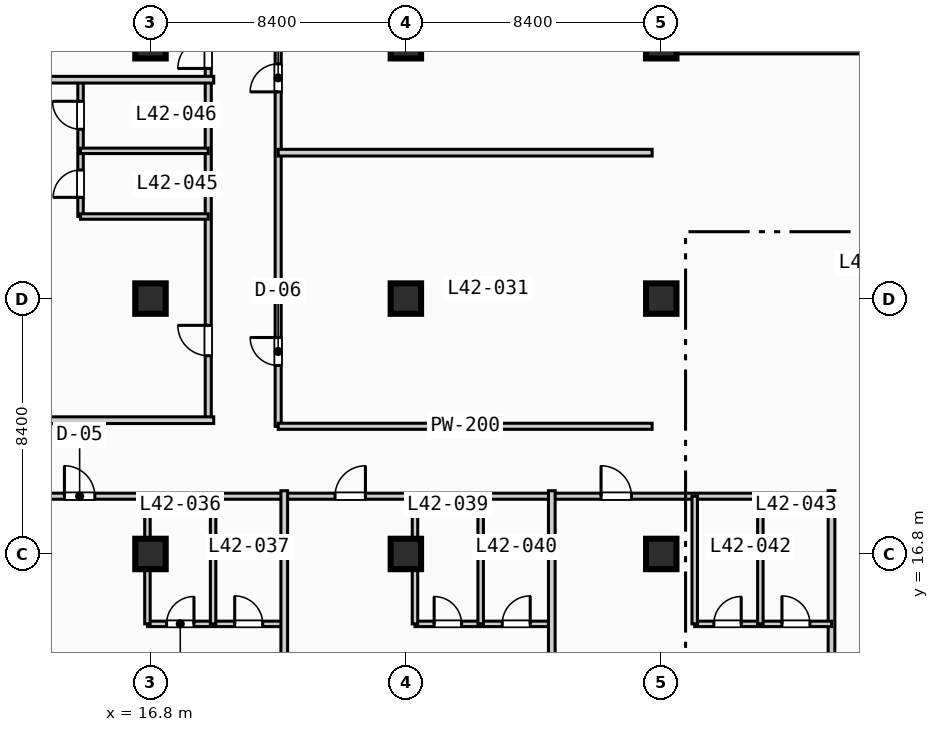
"""IFC4 building model, lengths in metres.
Left out: names, types, materials, properties, quantities, classifications, styles, units other than length and angle.
Written with IfcOpenShell. Run it as: python <this file> out.ifc"""

import sys

from ifc_helpers import new_model, si_unit, direction, frame, frame_2d, origin, origin_2d, place, context, subcontext, project, spatial, rectangle, extrude, element, fill, save


model = new_model("IFC4")
c1 = context("Model", 3, precision=1e-05, world=origin(), true_north=direction((0.0, 1.0)))
c2 = subcontext(c1, "Body", "Model", "MODEL_VIEW")
j1 = project(units=[si_unit("LENGTHUNIT", "METRE"), si_unit("PLANEANGLEUNIT", "RADIAN")], contexts=[c1])
p1 = place(None, origin())
s1 = spatial("IfcSite", under=j1, at=p1, CompositionType="ELEMENT")
p2 = place(p1, origin())
s2 = spatial("IfcBuilding", under=s1, at=p2, CompositionType="ELEMENT")
p3 = place(p2, frame((0.0, 0.0, 175.4)))
s3 = spatial("IfcBuildingStorey", under=s2, at=p3, CompositionType="ELEMENT", Elevation=175.4)
for number, where, z_axis, x_axis in (
    (1, (16.8, 16.8, 0.0), (0.0, 0.0, 1.0), (1.0, 0.0, 0.0)),
    (2, (16.8, 25.2, 0.0), (0.0, 0.0, 1.0), (1.0, 0.0, 0.0)),
    (3, (16.8, 33.6, 0.0), (0.0, 0.0, 1.0), (1.0, 0.0, 0.0)),
    (4, (25.2, 16.8, 0.0), (0.0, 0.0, 1.0), (1.0, 0.0, 0.0)),
    (5, (25.2, 25.2, 0.0), (0.0, 0.0, 1.0), (1.0, 0.0, 0.0)),
    (6, (25.2, 33.6, 0.0), (0.0, 0.0, 1.0), (1.0, 0.0, 0.0)),
    (7, (33.6, 16.8, 0.0), (0.0, 0.0, 1.0), (1.0, 0.0, 0.0)),
    (8, (33.6, 25.2, 0.0), (0.0, 0.0, 1.0), (1.0, 0.0, 0.0)),
    (9, (33.6, 33.6, 0.0), (0.0, 0.0, 1.0), (1.0, 0.0, 0.0)),
):
    element("IfcColumn", number, at=place(p3, frame(where, z_axis=z_axis, x_axis=x_axis)), inside=s3, PredefinedType="COLUMN", context=c2, shape_type="SweptSolid", body=[
        extrude(rectangle(XDim=1.0, YDim=1.0, at=origin_2d()), origin(), (0.0, 0.0, 1.0), 3.7),
    ])
p4 = place(p3, frame((33.425, 33.425, 0.0), z_axis=(0.0, 0.0, 1.0), x_axis=(1.0, 0.0, 0.0)))
e10 = element("IfcWall", 10, at=p4, inside=s3, PredefinedType="STANDARD", context=c2, shape_type="SweptSolid", body=[
    extrude(rectangle(XDim=39.0, YDim=0.35, at=frame_2d((19.5, 0.0))), origin(), (0.0, 0.0, 1.0), 3.47),
])
p5 = place(p4, frame((12.075, 0.0, 0.0)))
e11 = element("IfcOpeningElement", 11, at=p5, cuts=e10, PredefinedType="OPENING", context=c2, shape_type="SweptSolid", body=[
    extrude(rectangle(XDim=1.4, YDim=2.2, at=frame_2d((0.7, 1.1))), frame((0.0, 0.185, 0.0), z_axis=(0.0, -1.0, 0.0), x_axis=(1.0, 0.0, 0.0)), (0.0, 0.0, 1.0), 0.37),
])
p6 = place(p4, frame((20.275, 0.0, 0.85)))
e12 = element("IfcOpeningElement", 12, at=p6, cuts=e10, PredefinedType="OPENING", context=c2, shape_type="SweptSolid", body=[
    extrude(rectangle(XDim=1.8, YDim=1.8, at=frame_2d((0.9, 0.9))), frame((0.0, 0.185, 0.0), z_axis=(0.0, -1.0, 0.0), x_axis=(1.0, 0.0, 0.0)), (0.0, 0.0, 1.0), 0.37),
])
p7 = place(p4, frame((28.375, 0.0, 0.85)))
e13 = element("IfcOpeningElement", 13, at=p7, cuts=e10, PredefinedType="OPENING", context=c2, shape_type="SweptSolid", body=[
    extrude(rectangle(XDim=2.4, YDim=1.95, at=frame_2d((1.2, 0.975))), frame((0.0, 0.185, 0.0), z_axis=(0.0, -1.0, 0.0), x_axis=(1.0, 0.0, 0.0)), (0.0, 0.0, 1.0), 0.37),
])
p8 = place(p3, frame((21.0, 21.0, 0.0), z_axis=(0.0, 0.0, 1.0), x_axis=(0.0, 1.0, 0.0)))
e14 = element("IfcWall", 14, at=p8, inside=s3, PredefinedType="PARTITIONING", context=c2, shape_type="SweptSolid", body=[
    extrude(rectangle(XDim=18.2, YDim=0.2, at=frame_2d((9.1, 0.0))), origin(), (0.0, 0.0, 1.0), 3.47),
])
p9 = place(p8, frame((2.0, 0.0, 0.0)))
e15 = element("IfcOpeningElement", 15, at=p9, cuts=e14, PredefinedType="OPENING", context=c2, shape_type="SweptSolid", body=[
    extrude(rectangle(XDim=0.92, YDim=2.1, at=frame_2d((0.46, 1.05))), frame((0.0, 0.11, 0.0), z_axis=(0.0, -1.0, 0.0), x_axis=(1.0, 0.0, 0.0)), (0.0, 0.0, 1.0), 0.22),
])
p10 = place(p8, frame((11.0, 0.0, 0.0)))
e16 = element("IfcOpeningElement", 16, at=p10, cuts=e14, PredefinedType="OPENING", context=c2, shape_type="SweptSolid", body=[
    extrude(rectangle(XDim=0.92, YDim=2.1, at=frame_2d((0.46, 1.05))), frame((0.0, 0.11, 0.0), z_axis=(0.0, -1.0, 0.0), x_axis=(1.0, 0.0, 0.0)), (0.0, 0.0, 1.0), 0.22),
])
p11 = place(p3, frame((21.0, 21.0, 0.0), z_axis=(0.0, 0.0, 1.0), x_axis=(1.0, 0.0, 0.0)))
e17 = element("IfcWall", 17, at=p11, inside=s3, PredefinedType="PARTITIONING", context=c2, shape_type="SweptSolid", body=[
    extrude(rectangle(XDim=12.3, YDim=0.2, at=frame_2d((6.15, 0.0))), origin(), (0.0, 0.0, 1.0), 3.47),
])
p12 = place(p3, frame((21.0, 30.0, 0.0), z_axis=(0.0, 0.0, 1.0), x_axis=(1.0, 0.0, 0.0)))
e18 = element("IfcWall", 18, at=p12, inside=s3, PredefinedType="PARTITIONING", context=c2, shape_type="SweptSolid", body=[
    extrude(rectangle(XDim=12.3, YDim=0.22, at=frame_2d((6.15, 0.0))), origin(), (0.0, 0.0, 1.0), 3.47),
])
p13 = place(p3, frame((3.4, 18.7, 0.0), z_axis=(0.0, 0.0, 1.0), x_axis=(1.0, 0.0, 0.0)))
e19 = element("IfcWall", 19, at=p13, inside=s3, PredefinedType="PARTITIONING", context=c2, shape_type="SweptSolid", body=[
    extrude(rectangle(XDim=35.8, YDim=0.2, at=frame_2d((17.9, 0.0))), origin(), (0.0, 0.0, 1.0), 3.47),
])
p14 = place(p13, frame((1.67, 0.0, 0.0)))
e20 = element("IfcOpeningElement", 20, at=p14, cuts=e19, PredefinedType="OPENING", context=c2, shape_type="SweptSolid", body=[
    extrude(rectangle(XDim=1.0, YDim=2.15, at=frame_2d((0.5, 1.075))), frame((0.0, 0.11, 0.0), z_axis=(0.0, -1.0, 0.0), x_axis=(1.0, 0.0, 0.0)), (0.0, 0.0, 1.0), 0.22),
])
p15 = place(p13, frame((10.57, 0.0, 0.0)))
e21 = element("IfcOpeningElement", 21, at=p15, cuts=e19, PredefinedType="OPENING", context=c2, shape_type="SweptSolid", body=[
    extrude(rectangle(XDim=1.0, YDim=2.15, at=frame_2d((0.5, 1.075))), frame((0.0, 0.11, 0.0), z_axis=(0.0, -1.0, 0.0), x_axis=(1.0, 0.0, 0.0)), (0.0, 0.0, 1.0), 0.22),
])
p16 = place(p13, frame((19.47, 0.0, 0.0)))
e22 = element("IfcOpeningElement", 22, at=p16, cuts=e19, PredefinedType="OPENING", context=c2, shape_type="SweptSolid", body=[
    extrude(rectangle(XDim=1.0, YDim=2.15, at=frame_2d((0.5, 1.075))), frame((0.0, 0.11, 0.0), z_axis=(0.0, -1.0, 0.0), x_axis=(1.0, 0.0, 0.0)), (0.0, 0.0, 1.0), 0.22),
])
p17 = place(p13, frame((28.22, 0.0, 0.0)))
e23 = element("IfcOpeningElement", 23, at=p17, cuts=e19, PredefinedType="OPENING", context=c2, shape_type="SweptSolid", body=[
    extrude(rectangle(XDim=1.0, YDim=2.15, at=frame_2d((0.5, 1.075))), frame((0.0, 0.11, 0.0), z_axis=(0.0, -1.0, 0.0), x_axis=(1.0, 0.0, 0.0)), (0.0, 0.0, 1.0), 0.22),
])
p18 = place(p3, frame((16.7, 14.5, 0.0), z_axis=(0.0, 0.0, 1.0), x_axis=(1.0, 0.0, 0.0)))
e24 = element("IfcWall", 24, at=p18, inside=s3, PredefinedType="PLUMBINGWALL", context=c2, shape_type="SweptSolid", body=[
    extrude(rectangle(XDim=4.5, YDim=0.18, at=frame_2d((2.25, 0.0))), origin(), (0.0, 0.0, 1.0), 3.47),
])
p19 = place(p18, frame((0.63, 0.0, 0.0)))
e25 = element("IfcOpeningElement", 25, at=p19, cuts=e24, PredefinedType="OPENING", context=c2, shape_type="SweptSolid", body=[
    extrude(rectangle(XDim=0.9, YDim=2.1, at=frame_2d((0.45, 1.05))), frame((0.0, 0.1, 0.0), z_axis=(0.0, -1.0, 0.0), x_axis=(1.0, 0.0, 0.0)), (0.0, 0.0, 1.0), 0.2),
])
p20 = place(p18, frame((2.87, 0.0, 0.0)))
e26 = element("IfcOpeningElement", 26, at=p20, cuts=e24, PredefinedType="OPENING", context=c2, shape_type="SweptSolid", body=[
    extrude(rectangle(XDim=0.92, YDim=2.1, at=frame_2d((0.46, 1.05))), frame((0.0, 0.1, 0.0), z_axis=(0.0, -1.0, 0.0), x_axis=(1.0, 0.0, 0.0)), (0.0, 0.0, 1.0), 0.2),
])
p21 = place(p3, frame((16.7, 14.5, 0.0), z_axis=(0.0, 0.0, 1.0), x_axis=(0.0, 1.0, 0.0)))
e27 = element("IfcWall", 27, at=p21, inside=s3, PredefinedType="PLUMBINGWALL", context=c2, shape_type="SweptSolid", body=[
    extrude(rectangle(XDim=4.2, YDim=0.18, at=frame_2d((2.1, 0.0))), origin(), (0.0, 0.0, 1.0), 2.82),
])
p22 = place(p3, frame((18.86, 14.5, 0.0), z_axis=(0.0, 0.0, 1.0), x_axis=(0.0, 1.0, 0.0)))
e28 = element("IfcWall", 28, at=p22, inside=s3, PredefinedType="PLUMBINGWALL", context=c2, shape_type="SweptSolid", body=[
    extrude(rectangle(XDim=4.2, YDim=0.18, at=frame_2d((2.1, 0.0))), origin(), (0.0, 0.0, 1.0), 3.47),
])
p23 = place(p3, frame((21.2, 0.2, 0.0), z_axis=(0.0, 0.0, 1.0), x_axis=(0.0, 1.0, 0.0)))
e29 = element("IfcWall", 29, at=p23, inside=s3, PredefinedType="PARTITIONING", context=c2, shape_type="SweptSolid", body=[
    extrude(rectangle(XDim=18.68, YDim=0.22, at=frame_2d((9.34, 0.0))), origin(), (0.0, 0.0, 1.0), 3.47),
])
p24 = place(p3, frame((25.5, 14.5, 0.0), z_axis=(0.0, 0.0, 1.0), x_axis=(1.0, 0.0, 0.0)))
e30 = element("IfcWall", 30, at=p24, inside=s3, PredefinedType="PLUMBINGWALL", context=c2, shape_type="SweptSolid", body=[
    extrude(rectangle(XDim=4.5, YDim=0.18, at=frame_2d((2.25, 0.0))), origin(), (0.0, 0.0, 1.0), 3.47),
])
p25 = place(p24, frame((0.63, 0.0, 0.0)))
e31 = element("IfcOpeningElement", 31, at=p25, cuts=e30, PredefinedType="OPENING", context=c2, shape_type="SweptSolid", body=[
    extrude(rectangle(XDim=0.9, YDim=2.1, at=frame_2d((0.45, 1.05))), frame((0.0, 0.1, 0.0), z_axis=(0.0, -1.0, 0.0), x_axis=(1.0, 0.0, 0.0)), (0.0, 0.0, 1.0), 0.2),
])
p26 = place(p24, frame((2.87, 0.0, 0.0)))
e32 = element("IfcOpeningElement", 32, at=p26, cuts=e30, PredefinedType="OPENING", context=c2, shape_type="SweptSolid", body=[
    extrude(rectangle(XDim=0.92, YDim=2.1, at=frame_2d((0.46, 1.05))), frame((0.0, 0.1, 0.0), z_axis=(0.0, -1.0, 0.0), x_axis=(1.0, 0.0, 0.0)), (0.0, 0.0, 1.0), 0.2),
])
p27 = place(p3, frame((25.5, 14.5, 0.0), z_axis=(0.0, 0.0, 1.0), x_axis=(0.0, 1.0, 0.0)))
e33 = element("IfcWall", 33, at=p27, inside=s3, PredefinedType="PLUMBINGWALL", context=c2, shape_type="SweptSolid", body=[
    extrude(rectangle(XDim=4.2, YDim=0.18, at=frame_2d((2.1, 0.0))), origin(), (0.0, 0.0, 1.0), 2.82),
])
p28 = place(p3, frame((27.66, 14.5, 0.0), z_axis=(0.0, 0.0, 1.0), x_axis=(0.0, 1.0, 0.0)))
e34 = element("IfcWall", 34, at=p28, inside=s3, PredefinedType="PLUMBINGWALL", context=c2, shape_type="SweptSolid", body=[
    extrude(rectangle(XDim=4.2, YDim=0.18, at=frame_2d((2.1, 0.0))), origin(), (0.0, 0.0, 1.0), 3.47),
])
for number, where, z_axis, x_axis in (
    (35, (30.0, 0.2, 0.0), (0.0, 0.0, 1.0), (0.0, 1.0, 0.0)),
    (36, (39.2, 0.2, 0.0), (0.0, 0.0, 1.0), (0.0, 1.0, 0.0)),
):
    element("IfcWall", number, at=place(p3, frame(where, z_axis=z_axis, x_axis=x_axis)), inside=s3, PredefinedType="PARTITIONING", context=c2, shape_type="SweptSolid", body=[
        extrude(rectangle(XDim=18.68, YDim=0.22, at=frame_2d((9.34, 0.0))), origin(), (0.0, 0.0, 1.0), 3.47),
    ])
p29 = place(p3, frame((34.7, 14.5, 0.0), z_axis=(0.0, 0.0, 1.0), x_axis=(1.0, 0.0, 0.0)))
e37 = element("IfcWall", 37, at=p29, inside=s3, PredefinedType="PLUMBINGWALL", context=c2, shape_type="SweptSolid", body=[
    extrude(rectangle(XDim=4.5, YDim=0.18, at=frame_2d((2.25, 0.0))), origin(), (0.0, 0.0, 1.0), 3.47),
])
p30 = place(p29, frame((0.63, 0.0, 0.0)))
e38 = element("IfcOpeningElement", 38, at=p30, cuts=e37, PredefinedType="OPENING", context=c2, shape_type="SweptSolid", body=[
    extrude(rectangle(XDim=0.9, YDim=2.1, at=frame_2d((0.45, 1.05))), frame((0.0, 0.1, 0.0), z_axis=(0.0, -1.0, 0.0), x_axis=(1.0, 0.0, 0.0)), (0.0, 0.0, 1.0), 0.2),
])
p31 = place(p29, frame((2.87, 0.0, 0.0)))
e39 = element("IfcOpeningElement", 39, at=p31, cuts=e37, PredefinedType="OPENING", context=c2, shape_type="SweptSolid", body=[
    extrude(rectangle(XDim=0.92, YDim=2.1, at=frame_2d((0.46, 1.05))), frame((0.0, 0.1, 0.0), z_axis=(0.0, -1.0, 0.0), x_axis=(1.0, 0.0, 0.0)), (0.0, 0.0, 1.0), 0.2),
])
for number, where, z_axis, x_axis in (
    (40, (34.7, 14.5, 0.0), (0.0, 0.0, 1.0), (0.0, 1.0, 0.0)),
    (41, (36.86, 14.5, 0.0), (0.0, 0.0, 1.0), (0.0, 1.0, 0.0)),
):
    element("IfcWall", number, at=place(p3, frame(where, z_axis=z_axis, x_axis=x_axis)), inside=s3, PredefinedType="PLUMBINGWALL", context=c2, shape_type="SweptSolid", body=[
        extrude(rectangle(XDim=4.2, YDim=0.18, at=frame_2d((2.1, 0.0))), origin(), (0.0, 0.0, 1.0), 3.47),
    ])
p32 = place(p3, frame((18.7, 21.2, 0.0), z_axis=(0.0, 0.0, 1.0), x_axis=(0.0, 1.0, 0.0)))
e42 = element("IfcWall", 42, at=p32, inside=s3, PredefinedType="PARTITIONING", context=c2, shape_type="SweptSolid", body=[
    extrude(rectangle(XDim=18.0, YDim=0.2, at=frame_2d((9.0, 0.0))), origin(), (0.0, 0.0, 1.0), 3.47),
])
p33 = place(p32, frame((2.12, 0.0, 0.0)))
e43 = element("IfcOpeningElement", 43, at=p33, cuts=e42, PredefinedType="OPENING", context=c2, shape_type="SweptSolid", body=[
    extrude(rectangle(XDim=1.0, YDim=2.15, at=frame_2d((0.5, 1.075))), frame((0.0, 0.11, 0.0), z_axis=(0.0, -1.0, 0.0), x_axis=(1.0, 0.0, 0.0)), (0.0, 0.0, 1.0), 0.22),
])
p34 = place(p32, frame((11.57, 0.0, 0.0)))
e44 = element("IfcOpeningElement", 44, at=p34, cuts=e42, PredefinedType="OPENING", context=c2, shape_type="SweptSolid", body=[
    extrude(rectangle(XDim=1.0, YDim=2.15, at=frame_2d((0.5, 1.075))), frame((0.0, 0.11, 0.0), z_axis=(0.0, -1.0, 0.0), x_axis=(1.0, 0.0, 0.0)), (0.0, 0.0, 1.0), 0.22),
])
p35 = place(p3, frame((0.2, 21.2, 0.0), z_axis=(0.0, 0.0, 1.0), x_axis=(1.0, 0.0, 0.0)))
e45 = element("IfcWall", 45, at=p35, inside=s3, PredefinedType="PARTITIONING", context=c2, shape_type="SweptSolid", body=[
    extrude(rectangle(XDim=18.68, YDim=0.22, at=frame_2d((9.34, 0.0))), origin(), (0.0, 0.0, 1.0), 3.47),
])
p36 = place(p3, frame((14.5, 27.9, 0.0), z_axis=(0.0, 0.0, 1.0), x_axis=(0.0, 1.0, 0.0)))
e46 = element("IfcWall", 46, at=p36, inside=s3, PredefinedType="PLUMBINGWALL", context=c2, shape_type="SweptSolid", body=[
    extrude(rectangle(XDim=4.5, YDim=0.18, at=frame_2d((2.25, 0.0))), origin(), (0.0, 0.0, 1.0), 3.47),
])
p37 = place(p36, frame((0.63, 0.0, 0.0)))
e47 = element("IfcOpeningElement", 47, at=p37, cuts=e46, PredefinedType="OPENING", context=c2, shape_type="SweptSolid", body=[
    extrude(rectangle(XDim=0.9, YDim=2.1, at=frame_2d((0.45, 1.05))), frame((0.0, 0.1, 0.0), z_axis=(0.0, -1.0, 0.0), x_axis=(1.0, 0.0, 0.0)), (0.0, 0.0, 1.0), 0.2),
])
p38 = place(p36, frame((2.87, 0.0, 0.0)))
e48 = element("IfcOpeningElement", 48, at=p38, cuts=e46, PredefinedType="OPENING", context=c2, shape_type="SweptSolid", body=[
    extrude(rectangle(XDim=0.92, YDim=2.1, at=frame_2d((0.46, 1.05))), frame((0.0, 0.1, 0.0), z_axis=(0.0, -1.0, 0.0), x_axis=(1.0, 0.0, 0.0)), (0.0, 0.0, 1.0), 0.2),
])
for number, where, z_axis, x_axis in (
    (49, (14.5, 27.9, 0.0), (0.0, 0.0, 1.0), (1.0, 0.0, 0.0)),
    (50, (14.5, 30.06, 0.0), (0.0, 0.0, 1.0), (1.0, 0.0, 0.0)),
):
    element("IfcWall", number, at=place(p3, frame(where, z_axis=z_axis, x_axis=x_axis)), inside=s3, PredefinedType="PLUMBINGWALL", context=c2, shape_type="SweptSolid", body=[
        extrude(rectangle(XDim=4.2, YDim=0.18, at=frame_2d((2.1, 0.0))), origin(), (0.0, 0.0, 1.0), 3.47),
    ])
p39 = place(p3, frame((0.2, 32.4, 0.0), z_axis=(0.0, 0.0, 1.0), x_axis=(1.0, 0.0, 0.0)))
e51 = element("IfcWall", 51, at=p39, inside=s3, PredefinedType="PARTITIONING", context=c2, shape_type="SweptSolid", body=[
    extrude(rectangle(XDim=18.68, YDim=0.22, at=frame_2d((9.34, 0.0))), origin(), (0.0, 0.0, 1.0), 3.47),
])
p40 = place(p9, origin())
e52 = element("IfcDoor", 52, at=p40, inside=s3, OperationType="SINGLE_SWING_RIGHT", PredefinedType="DOOR", context=c2, shape_type="SweptSolid", body=[
    extrude(rectangle(XDim=0.92, YDim=2.1, at=frame_2d((0.46, 1.05))), frame((0.0, 0.025, 0.0), z_axis=(0.0, -1.0, 0.0), x_axis=(1.0, 0.0, 0.0)), (0.0, 0.0, 1.0), 0.05),
])
fill(e15, e52)
p41 = place(p10, origin())
e53 = element("IfcDoor", 53, at=p41, inside=s3, OperationType="SINGLE_SWING_LEFT", PredefinedType="DOOR", context=c2, shape_type="SweptSolid", body=[
    extrude(rectangle(XDim=0.92, YDim=2.1, at=frame_2d((0.46, 1.05))), frame((0.0, 0.025, 0.0), z_axis=(0.0, -1.0, 0.0), x_axis=(1.0, 0.0, 0.0)), (0.0, 0.0, 1.0), 0.05),
])
fill(e16, e53)
p42 = place(p15, origin())
e54 = element("IfcDoor", 54, at=p42, inside=s3, OperationType="SINGLE_SWING_LEFT", PredefinedType="DOOR", context=c2, shape_type="SweptSolid", body=[
    extrude(rectangle(XDim=1.0, YDim=2.15, at=frame_2d((0.5, 1.075))), frame((0.0, 0.025, 0.0), z_axis=(0.0, -1.0, 0.0), x_axis=(1.0, 0.0, 0.0)), (0.0, 0.0, 1.0), 0.05),
])
fill(e21, e54)
p43 = place(p16, origin())
e55 = element("IfcDoor", 55, at=p43, inside=s3, OperationType="SINGLE_SWING_RIGHT", PredefinedType="DOOR", context=c2, shape_type="SweptSolid", body=[
    extrude(rectangle(XDim=1.0, YDim=2.15, at=frame_2d((0.5, 1.075))), frame((0.0, 0.025, 0.0), z_axis=(0.0, -1.0, 0.0), x_axis=(1.0, 0.0, 0.0)), (0.0, 0.0, 1.0), 0.05),
])
fill(e22, e55)
p44 = place(p17, origin())
e56 = element("IfcDoor", 56, at=p44, inside=s3, OperationType="SINGLE_SWING_LEFT", PredefinedType="DOOR", context=c2, shape_type="SweptSolid", body=[
    extrude(rectangle(XDim=1.0, YDim=2.15, at=frame_2d((0.5, 1.075))), frame((0.0, 0.025, 0.0), z_axis=(0.0, -1.0, 0.0), x_axis=(1.0, 0.0, 0.0)), (0.0, 0.0, 1.0), 0.05),
])
fill(e23, e56)
p45 = place(p19, origin())
e57 = element("IfcDoor", 57, at=p45, inside=s3, OperationType="SINGLE_SWING_RIGHT", PredefinedType="DOOR", context=c2, shape_type="SweptSolid", body=[
    extrude(rectangle(XDim=0.9, YDim=2.1, at=frame_2d((0.45, 1.05))), frame((0.0, 0.025, 0.0), z_axis=(0.0, -1.0, 0.0), x_axis=(1.0, 0.0, 0.0)), (0.0, 0.0, 1.0), 0.05),
])
fill(e25, e57)
p46 = place(p20, origin())
e58 = element("IfcDoor", 58, at=p46, inside=s3, OperationType="SINGLE_SWING_LEFT", PredefinedType="DOOR", context=c2, shape_type="SweptSolid", body=[
    extrude(rectangle(XDim=0.92, YDim=2.1, at=frame_2d((0.46, 1.05))), frame((0.0, 0.025, 0.0), z_axis=(0.0, -1.0, 0.0), x_axis=(1.0, 0.0, 0.0)), (0.0, 0.0, 1.0), 0.05),
])
fill(e26, e58)
p47 = place(p25, origin())
e59 = element("IfcDoor", 59, at=p47, inside=s3, OperationType="SINGLE_SWING_LEFT", PredefinedType="DOOR", context=c2, shape_type="SweptSolid", body=[
    extrude(rectangle(XDim=0.9, YDim=2.1, at=frame_2d((0.45, 1.05))), frame((0.0, 0.025, 0.0), z_axis=(0.0, -1.0, 0.0), x_axis=(1.0, 0.0, 0.0)), (0.0, 0.0, 1.0), 0.05),
])
fill(e31, e59)
p48 = place(p26, origin())
e60 = element("IfcDoor", 60, at=p48, inside=s3, OperationType="SINGLE_SWING_RIGHT", PredefinedType="DOOR", context=c2, shape_type="SweptSolid", body=[
    extrude(rectangle(XDim=0.92, YDim=2.1, at=frame_2d((0.46, 1.05))), frame((0.0, 0.025, 0.0), z_axis=(0.0, -1.0, 0.0), x_axis=(1.0, 0.0, 0.0)), (0.0, 0.0, 1.0), 0.05),
])
fill(e32, e60)
p49 = place(p30, origin())
e61 = element("IfcDoor", 61, at=p49, inside=s3, OperationType="SINGLE_SWING_RIGHT", PredefinedType="DOOR", context=c2, shape_type="SweptSolid", body=[
    extrude(rectangle(XDim=0.9, YDim=2.1, at=frame_2d((0.45, 1.05))), frame((0.0, 0.025, 0.0), z_axis=(0.0, -1.0, 0.0), x_axis=(1.0, 0.0, 0.0)), (0.0, 0.0, 1.0), 0.05),
])
fill(e38, e61)
p50 = place(p31, origin())
e62 = element("IfcDoor", 62, at=p50, inside=s3, OperationType="SINGLE_SWING_LEFT", PredefinedType="DOOR", context=c2, shape_type="SweptSolid", body=[
    extrude(rectangle(XDim=0.92, YDim=2.1, at=frame_2d((0.46, 1.05))), frame((0.0, 0.025, 0.0), z_axis=(0.0, -1.0, 0.0), x_axis=(1.0, 0.0, 0.0)), (0.0, 0.0, 1.0), 0.05),
])
fill(e39, e62)
p51 = place(p33, origin())
e63 = element("IfcDoor", 63, at=p51, inside=s3, OperationType="SINGLE_SWING_RIGHT", PredefinedType="DOOR", context=c2, shape_type="SweptSolid", body=[
    extrude(rectangle(XDim=1.0, YDim=2.15, at=frame_2d((0.5, 1.075))), frame((0.0, 0.025, 0.0), z_axis=(0.0, -1.0, 0.0), x_axis=(1.0, 0.0, 0.0)), (0.0, 0.0, 1.0), 0.05),
])
fill(e43, e63)
p52 = place(p34, origin())
e64 = element("IfcDoor", 64, at=p52, inside=s3, OperationType="SINGLE_SWING_LEFT", PredefinedType="DOOR", context=c2, shape_type="SweptSolid", body=[
    extrude(rectangle(XDim=1.0, YDim=2.15, at=frame_2d((0.5, 1.075))), frame((0.0, 0.025, 0.0), z_axis=(0.0, -1.0, 0.0), x_axis=(1.0, 0.0, 0.0)), (0.0, 0.0, 1.0), 0.05),
])
fill(e44, e64)
p53 = place(p37, origin())
e65 = element("IfcDoor", 65, at=p53, inside=s3, OperationType="SINGLE_SWING_LEFT", PredefinedType="DOOR", context=c2, shape_type="SweptSolid", body=[
    extrude(rectangle(XDim=0.9, YDim=2.1, at=frame_2d((0.45, 1.05))), frame((0.0, 0.025, 0.0), z_axis=(0.0, -1.0, 0.0), x_axis=(1.0, 0.0, 0.0)), (0.0, 0.0, 1.0), 0.05),
])
fill(e47, e65)
p54 = place(p38, origin())
e66 = element("IfcDoor", 66, at=p54, inside=s3, OperationType="SINGLE_SWING_RIGHT", PredefinedType="DOOR", context=c2, shape_type="SweptSolid", body=[
    extrude(rectangle(XDim=0.92, YDim=2.1, at=frame_2d((0.46, 1.05))), frame((0.0, 0.025, 0.0), z_axis=(0.0, -1.0, 0.0), x_axis=(1.0, 0.0, 0.0)), (0.0, 0.0, 1.0), 0.05),
])
fill(e48, e66)
save(model, sys.argv[1])
